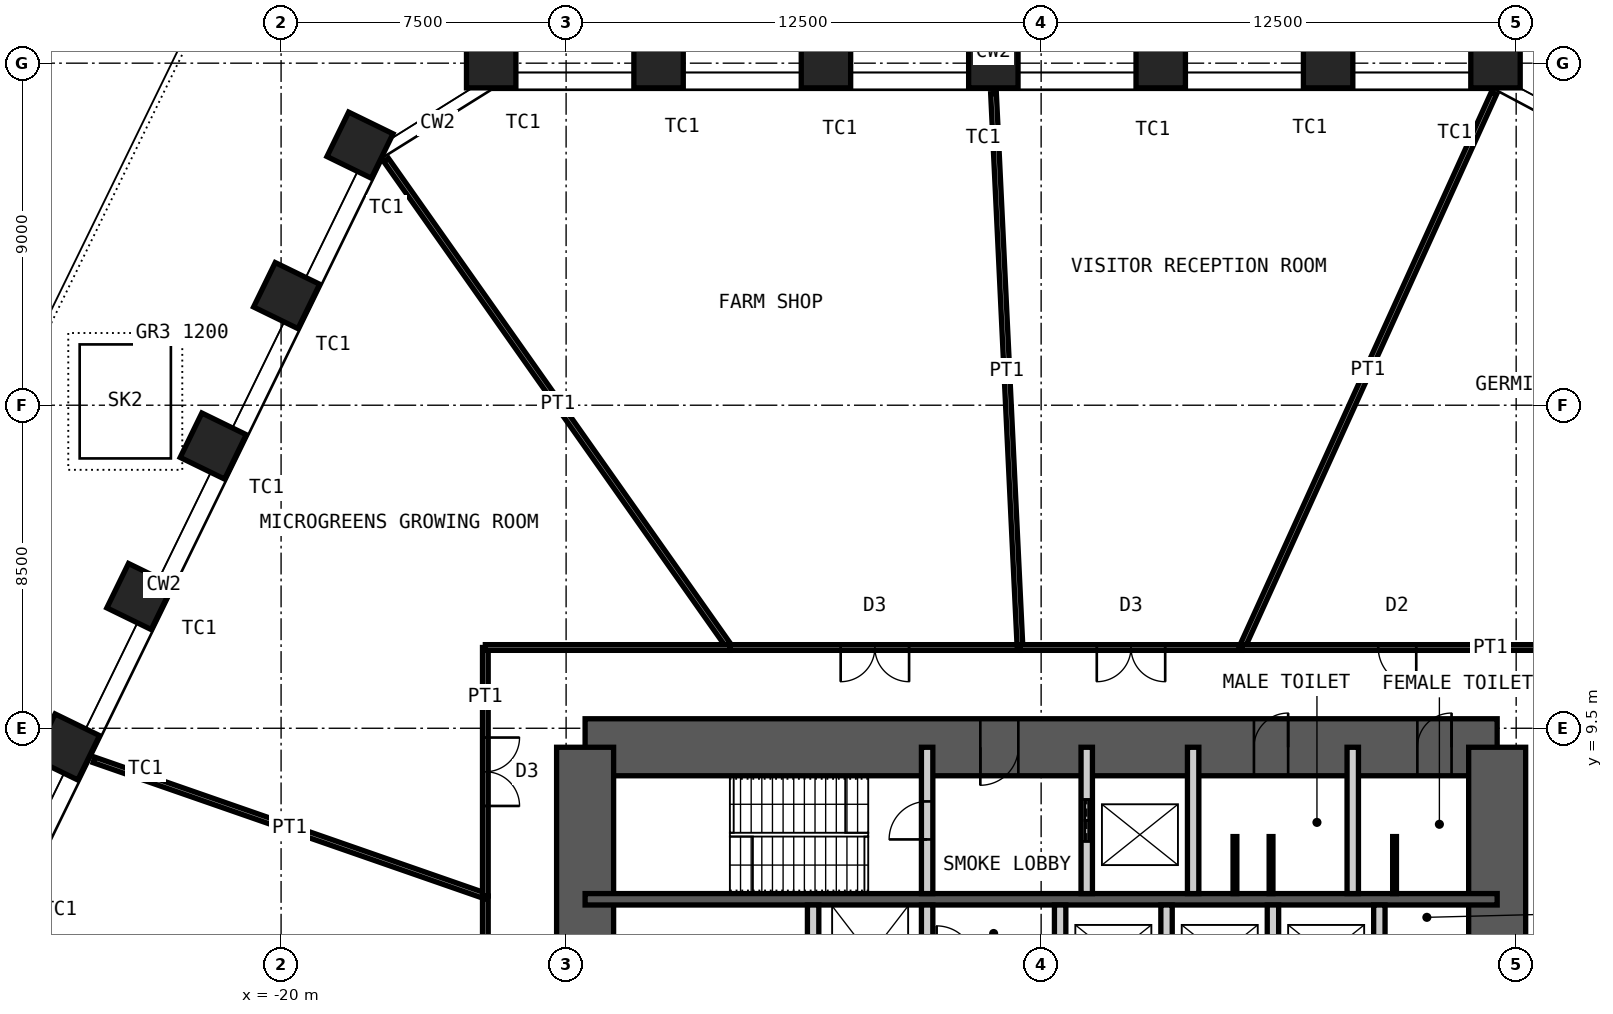
"""IFC4 building model, lengths in metres.
Left out: names, types, materials, properties, quantities, classifications, styles, units other than length and angle.
Written with IfcOpenShell. Run it as: python <this file> out.ifc"""

import sys

from ifc_helpers import new_model, si_unit, direction, frame, frame_2d, origin, origin_2d, place, context, subcontext, project, spatial, rectangle, hollow_rectangle, extrude, element, fill, save


model = new_model("IFC4")
c1 = context("Model", 3, precision=1e-05, world=origin(), true_north=direction((0.0, 1.0)))
c2 = subcontext(c1, "Body", "Model", "MODEL_VIEW")
j1 = project(units=[si_unit("LENGTHUNIT", "METRE"), si_unit("PLANEANGLEUNIT", "RADIAN")], contexts=[c1])
p1 = place(None, origin())
s1 = spatial("IfcSite", under=j1, at=p1, CompositionType="ELEMENT")
p2 = place(p1, origin())
s2 = spatial("IfcBuilding", under=s1, at=p2, CompositionType="ELEMENT")
p3 = place(p2, frame((0.0, 0.0, 17.0)))
s3 = spatial("IfcBuildingStorey", under=s2, at=p3, CompositionType="ELEMENT", Elevation=17.0)
for number, where, z_axis, x_axis in (
    (1, (-14.471, 27.0, 0.0), (0.0, 0.0, 1.0), (-1.0, 0.0, 0.0)),
    (2, (-10.067, 27.0, 0.0), (0.0, 0.0, 1.0), (-1.0, 0.0, 0.0)),
    (3, (-5.662, 27.0, 0.0), (0.0, 0.0, 1.0), (-1.0, 0.0, 0.0)),
    (4, (-1.258, 27.0, 0.0), (0.0, 0.0, 1.0), (-1.0, 0.0, 0.0)),
    (5, (3.147, 27.0, 0.0), (0.0, 0.0, 1.0), (-1.0, 0.0, 0.0)),
    (6, (7.552, 27.0, 0.0), (0.0, 0.0, 1.0), (-1.0, 0.0, 0.0)),
    (7, (11.956, 27.0, 0.0), (0.0, 0.0, 1.0), (-1.0, 0.0, 0.0)),
    (8, (-25.647, 9.008, 0.0), (0.0, 0.0, 1.0), (-0.438, -0.899, 0.0)),
    (9, (-23.716, 12.966, 0.0), (0.0, 0.0, 1.0), (-0.438, -0.899, 0.0)),
    (10, (-21.785, 16.925, 0.0), (0.0, 0.0, 1.0), (-0.438, -0.899, 0.0)),
    (11, (-19.854, 20.884, 0.0), (0.0, 0.0, 1.0), (-0.438, -0.899, 0.0)),
    (12, (-17.924, 24.843, 0.0), (0.0, 0.0, 1.0), (-0.438, -0.899, 0.0)),
):
    element("IfcColumn", number, at=place(p3, frame(where, z_axis=z_axis, x_axis=x_axis)), inside=s3, PredefinedType="COLUMN", context=c2, shape_type="SweptSolid", body=[
        extrude(hollow_rectangle(XDim=1.3, YDim=1.3, WallThickness=0.1, at=origin_2d()), origin(), (0.0, 0.0, 1.0), 5.0),
    ])
p4 = place(p3, frame((-12.0, 9.0, 0.0), z_axis=(0.0, 0.0, 1.0), x_axis=(1.0, 0.0, 0.0)))
e13 = element("IfcWall", 13, at=p4, inside=s3, PredefinedType="SHEAR", context=c2, shape_type="SweptSolid", body=[
    extrude(rectangle(XDim=24.0, YDim=1.5, at=frame_2d((12.0, 0.0))), origin(), (0.0, 0.0, 1.0), 5.0),
])
p5 = place(p4, frame((10.4, 0.0, 0.0)))
e14 = element("IfcOpeningElement", 14, at=p5, cuts=e13, PredefinedType="OPENING", context=c2, shape_type="SweptSolid", body=[
    extrude(rectangle(XDim=1.0, YDim=2.1, at=frame_2d((0.5, 1.05))), frame((0.0, 0.76, 0.0), z_axis=(0.0, -1.0, 0.0), x_axis=(1.0, 0.0, 0.0)), (0.0, 0.0, 1.0), 1.52),
])
p6 = place(p4, frame((17.6, 0.0, 0.0)))
e15 = element("IfcOpeningElement", 15, at=p6, cuts=e13, PredefinedType="OPENING", context=c2, shape_type="SweptSolid", body=[
    extrude(rectangle(XDim=0.9, YDim=2.1, at=frame_2d((0.45, 1.05))), frame((0.0, 0.76, 0.0), z_axis=(0.0, -1.0, 0.0), x_axis=(1.0, 0.0, 0.0)), (0.0, 0.0, 1.0), 1.52),
])
p7 = place(p4, frame((21.9, 0.0, 0.0)))
e16 = element("IfcOpeningElement", 16, at=p7, cuts=e13, PredefinedType="OPENING", context=c2, shape_type="SweptSolid", body=[
    extrude(rectangle(XDim=0.9, YDim=2.1, at=frame_2d((0.45, 1.05))), frame((0.0, 0.76, 0.0), z_axis=(0.0, -1.0, 0.0), x_axis=(1.0, 0.0, 0.0)), (0.0, 0.0, 1.0), 1.52),
])
p8 = place(p3, frame((12.0, -9.0, 0.0), z_axis=(0.0, 0.0, 1.0), x_axis=(0.0, 1.0, 0.0)))
e17 = element("IfcWall", 17, at=p8, inside=s3, PredefinedType="SHEAR", context=c2, shape_type="SweptSolid", body=[
    extrude(rectangle(XDim=18.0, YDim=1.5, at=frame_2d((9.0, 0.0))), origin(), (0.0, 0.0, 1.0), 5.0),
])
p9 = place(p8, frame((8.1, 0.0, 0.0)))
e18 = element("IfcOpeningElement", 18, at=p9, cuts=e17, PredefinedType="OPENING", context=c2, shape_type="SweptSolid", body=[
    extrude(rectangle(XDim=1.8, YDim=2.1, at=frame_2d((0.9, 1.05))), frame((0.0, 0.76, 0.0), z_axis=(0.0, -1.0, 0.0), x_axis=(1.0, 0.0, 0.0)), (0.0, 0.0, 1.0), 1.52),
])
p10 = place(p3, frame((-12.0, -9.0, 0.0), z_axis=(0.0, 0.0, 1.0), x_axis=(0.0, 1.0, 0.0)))
e19 = element("IfcWall", 19, at=p10, inside=s3, PredefinedType="SHEAR", context=c2, shape_type="SweptSolid", body=[
    extrude(rectangle(XDim=18.0, YDim=1.5, at=frame_2d((9.0, 0.0))), origin(), (0.0, 0.0, 1.0), 5.0),
])
p11 = place(p10, frame((8.1, 0.0, 0.0)))
e20 = element("IfcOpeningElement", 20, at=p11, cuts=e19, PredefinedType="OPENING", context=c2, shape_type="SweptSolid", body=[
    extrude(rectangle(XDim=1.8, YDim=2.1, at=frame_2d((0.9, 1.05))), frame((0.0, 0.76, 0.0), z_axis=(0.0, -1.0, 0.0), x_axis=(1.0, 0.0, 0.0)), (0.0, 0.0, 1.0), 1.52),
])
p12 = place(p3, frame((-12.0, 5.0, 0.0), z_axis=(0.0, 0.0, 1.0), x_axis=(1.0, 0.0, 0.0)))
e21 = element("IfcWall", 21, at=p12, inside=s3, PredefinedType="SHEAR", context=c2, shape_type="SweptSolid", body=[
    extrude(rectangle(XDim=24.0, YDim=0.3, at=frame_2d((12.0, 0.0))), origin(), (0.0, 0.0, 1.0), 5.0),
])
p13 = place(p3, frame((-3.0, 5.15, 0.0), z_axis=(0.0, 0.0, 1.0), x_axis=(0.0, 1.0, 0.0)))
e22 = element("IfcWall", 22, at=p13, inside=s3, PredefinedType="PARTITIONING", context=c2, shape_type="SweptSolid", body=[
    extrude(rectangle(XDim=3.85, YDim=0.3, at=frame_2d((1.925, 0.0))), origin(), (0.0, 0.0, 1.0), 4.78),
])
p14 = place(p13, frame((1.425, 0.0, 0.0)))
e23 = element("IfcOpeningElement", 23, at=p14, cuts=e22, PredefinedType="OPENING", context=c2, shape_type="SweptSolid", body=[
    extrude(rectangle(XDim=1.0, YDim=2.1, at=frame_2d((0.5, 1.05))), frame((0.0, 0.16, 0.0), z_axis=(0.0, -1.0, 0.0), x_axis=(1.0, 0.0, 0.0)), (0.0, 0.0, 1.0), 0.32),
])
p15 = place(p3, frame((1.2, 5.15, 0.0), z_axis=(0.0, 0.0, 1.0), x_axis=(0.0, 1.0, 0.0)))
e24 = element("IfcWall", 24, at=p15, inside=s3, PredefinedType="PARTITIONING", context=c2, shape_type="SweptSolid", body=[
    extrude(rectangle(XDim=3.85, YDim=0.3, at=frame_2d((1.925, 0.0))), origin(), (0.0, 0.0, 1.0), 4.78),
])
p16 = place(p15, frame((1.375, 0.0, 0.0)))
e25 = element("IfcOpeningElement", 25, at=p16, cuts=e24, PredefinedType="OPENING", context=c2, shape_type="SweptSolid", body=[
    extrude(rectangle(XDim=1.1, YDim=2.4, at=frame_2d((0.55, 1.2))), frame((0.0, 0.16, 0.0), z_axis=(0.0, -1.0, 0.0), x_axis=(1.0, 0.0, 0.0)), (0.0, 0.0, 1.0), 0.32),
])
for number, where, z_axis, x_axis in (
    (26, (4.0, 5.15, 0.0), (0.0, 0.0, 1.0), (0.0, 1.0, 0.0)),
    (27, (8.2, 5.15, 0.0), (0.0, 0.0, 1.0), (0.0, 1.0, 0.0)),
):
    element("IfcWall", number, at=place(p3, frame(where, z_axis=z_axis, x_axis=x_axis)), inside=s3, PredefinedType="PARTITIONING", context=c2, shape_type="SweptSolid", body=[
        extrude(rectangle(XDim=3.85, YDim=0.3, at=frame_2d((1.925, 0.0))), origin(), (0.0, 0.0, 1.0), 4.78),
    ])
for number, where, z_axis, x_axis in (
    (28, (-6.0, 2.2, 0.0), (0.0, 0.0, 1.0), (0.0, 1.0, 0.0)),
    (29, (-3.0, 2.2, 0.0), (0.0, 0.0, 1.0), (0.0, 1.0, 0.0)),
    (30, (0.5, 2.2, 0.0), (0.0, 0.0, 1.0), (0.0, 1.0, 0.0)),
    (31, (3.3, 2.2, 0.0), (0.0, 0.0, 1.0), (0.0, 1.0, 0.0)),
    (32, (6.1, 2.2, 0.0), (0.0, 0.0, 1.0), (0.0, 1.0, 0.0)),
    (33, (8.9, 2.2, 0.0), (0.0, 0.0, 1.0), (0.0, 1.0, 0.0)),
):
    element("IfcWall", number, at=place(p3, frame(where, z_axis=z_axis, x_axis=x_axis)), inside=s3, PredefinedType="PARTITIONING", context=c2, shape_type="SweptSolid", body=[
        extrude(rectangle(XDim=2.65, YDim=0.3, at=frame_2d((1.325, 0.0))), origin(), (0.0, 0.0, 1.0), 4.78),
    ])
for number, where, z_axis, x_axis in (
    (34, (5.1, 5.15, 0.0), (0.0, 0.0, 1.0), (0.0, 1.0, 0.0)),
    (35, (6.05, 5.15, 0.0), (0.0, 0.0, 1.0), (0.0, 1.0, 0.0)),
    (36, (9.3, 5.15, 0.0), (0.0, 0.0, 1.0), (0.0, 1.0, 0.0)),
):
    element("IfcWall", number, at=place(p3, frame(where, z_axis=z_axis, x_axis=x_axis)), inside=s3, PredefinedType="PARTITIONING", context=c2, shape_type="SweptSolid", body=[
        extrude(rectangle(XDim=1.5, YDim=0.1, at=frame_2d((0.75, 0.0))), origin(), (0.0, 0.0, 1.0), 2.1),
    ])
p17 = place(p3, frame((-17.237, 24.454, 0.0), z_axis=(0.0, 0.0, 1.0), x_axis=(0.576128572739, -0.817359081233, 0.0)))
e37 = element("IfcWall", 37, at=p17, inside=s3, PredefinedType="PARTITIONING", context=c2, shape_type="SweptSolid", body=[
    extrude(rectangle(XDim=15.696, YDim=0.15, at=frame_2d((7.848, 0.0))), origin(), (0.0, 0.0, 1.0), 3.7),
])
p18 = place(p3, frame((-8.194, 11.625, 0.0), z_axis=(0.0, 0.0, 1.0), x_axis=(1.0, 0.0, 0.0)))
e38 = element("IfcWall", 38, at=p18, inside=s3, PredefinedType="PARTITIONING", context=c2, shape_type="SweptSolid", body=[
    extrude(rectangle(XDim=7.638, YDim=0.15, at=frame_2d((3.819, 0.0))), origin(), (0.0, 0.0, 1.0), 4.8),
])
p19 = place(p18, frame((2.919, 0.0, 0.0)))
e39 = element("IfcOpeningElement", 39, at=p19, cuts=e38, PredefinedType="OPENING", context=c2, shape_type="SweptSolid", body=[
    extrude(rectangle(XDim=1.8, YDim=2.4, at=frame_2d((0.9, 1.2))), frame((0.0, 0.085, 0.0), z_axis=(0.0, -1.0, 0.0), x_axis=(1.0, 0.0, 0.0)), (0.0, 0.0, 1.0), 0.17),
])
p20 = place(p3, frame((-1.253, 26.2, 0.0), z_axis=(0.0, 0.0, 1.0), x_axis=(0.047767854541, -0.998858464485, 0.0)))
e40 = element("IfcWall", 40, at=p20, inside=s3, PredefinedType="PARTITIONING", context=c2, shape_type="SweptSolid", body=[
    extrude(rectangle(XDim=14.592, YDim=0.15, at=frame_2d((7.296, 0.0))), origin(), (0.0, 0.0, 1.0), 3.7),
])
p21 = place(p3, frame((-0.556, 11.625, 0.0), z_axis=(0.0, 0.0, 1.0), x_axis=(1.0, 0.0, 0.0)))
e41 = element("IfcWall", 41, at=p21, inside=s3, PredefinedType="PARTITIONING", context=c2, shape_type="SweptSolid", body=[
    extrude(rectangle(XDim=5.841, YDim=0.15, at=frame_2d((2.92, 0.0))), origin(), (0.0, 0.0, 1.0), 4.8),
])
p22 = place(p21, frame((2.02, 0.0, 0.0)))
e42 = element("IfcOpeningElement", 42, at=p22, cuts=e41, PredefinedType="OPENING", context=c2, shape_type="SweptSolid", body=[
    extrude(rectangle(XDim=1.8, YDim=2.4, at=frame_2d((0.9, 1.2))), frame((0.0, 0.085, 0.0), z_axis=(0.0, -1.0, 0.0), x_axis=(1.0, 0.0, 0.0)), (0.0, 0.0, 1.0), 0.17),
])
p23 = place(p3, frame((11.915, 26.209, 0.0), z_axis=(0.0, 0.0, 1.0), x_axis=(-0.41384427845, -0.910347688081, 0.0)))
e43 = element("IfcWall", 43, at=p23, inside=s3, PredefinedType="PARTITIONING", context=c2, shape_type="SweptSolid", body=[
    extrude(rectangle(XDim=16.02, YDim=0.15, at=frame_2d((8.01, 0.0))), origin(), (0.0, 0.0, 1.0), 3.7),
])
p24 = place(p3, frame((5.285, 11.625, 0.0), z_axis=(0.0, 0.0, 1.0), x_axis=(1.0, 0.0, 0.0)))
e44 = element("IfcWall", 44, at=p24, inside=s3, PredefinedType="PARTITIONING", context=c2, shape_type="SweptSolid", body=[
    extrude(rectangle(XDim=8.172, YDim=0.15, at=frame_2d((4.086, 0.0))), origin(), (0.0, 0.0, 1.0), 4.8),
])
p25 = place(p24, frame((3.586, 0.0, 0.0)))
e45 = element("IfcOpeningElement", 45, at=p25, cuts=e44, PredefinedType="OPENING", context=c2, shape_type="SweptSolid", body=[
    extrude(rectangle(XDim=1.0, YDim=2.4, at=frame_2d((0.5, 1.2))), frame((0.0, 0.085, 0.0), z_axis=(0.0, -1.0, 0.0), x_axis=(1.0, 0.0, 0.0)), (0.0, 0.0, 1.0), 0.17),
])
p26 = place(p3, frame((-14.625, -1.422, 0.0), z_axis=(0.0, 0.0, 1.0), x_axis=(0.0, 1.0, 0.0)))
e46 = element("IfcWall", 46, at=p26, inside=s3, PredefinedType="PARTITIONING", context=c2, shape_type="SweptSolid", body=[
    extrude(rectangle(XDim=6.508, YDim=0.15, at=frame_2d((3.254, 0.0))), origin(), (0.0, 0.0, 1.0), 4.8),
])
p27 = place(p26, frame((2.754, 0.0, 0.0)))
e47 = element("IfcOpeningElement", 47, at=p27, cuts=e46, PredefinedType="OPENING", context=c2, shape_type="SweptSolid", body=[
    extrude(rectangle(XDim=1.0, YDim=2.4, at=frame_2d((0.5, 1.2))), frame((0.0, 0.085, 0.0), z_axis=(0.0, -1.0, 0.0), x_axis=(1.0, 0.0, 0.0)), (0.0, 0.0, 1.0), 0.17),
])
p28 = place(p3, frame((-24.923, 8.668, 0.0), z_axis=(0.0, 0.0, 1.0), x_axis=(0.944503744172, -0.328500650295, 0.0)))
e48 = element("IfcWall", 48, at=p28, inside=s3, PredefinedType="PARTITIONING", context=c2, shape_type="SweptSolid", body=[
    extrude(rectangle(XDim=10.903, YDim=0.15, at=frame_2d((5.452, 0.0))), origin(), (0.0, 0.0, 1.0), 3.7),
])
p29 = place(p3, frame((-14.625, 5.086, 0.0), z_axis=(0.0, 0.0, 1.0), x_axis=(0.0, 1.0, 0.0)))
e49 = element("IfcWall", 49, at=p29, inside=s3, PredefinedType="PARTITIONING", context=c2, shape_type="SweptSolid", body=[
    extrude(rectangle(XDim=6.539, YDim=0.15, at=frame_2d((3.27, 0.0))), origin(), (0.0, 0.0, 1.0), 4.8),
])
p30 = place(p29, frame((2.369, 0.0, 0.0)))
e50 = element("IfcOpeningElement", 50, at=p30, cuts=e49, PredefinedType="OPENING", context=c2, shape_type="SweptSolid", body=[
    extrude(rectangle(XDim=1.8, YDim=2.4, at=frame_2d((0.9, 1.2))), frame((0.0, 0.085, 0.0), z_axis=(0.0, -1.0, 0.0), x_axis=(1.0, 0.0, 0.0)), (0.0, 0.0, 1.0), 0.17),
])
p31 = place(p3, frame((-14.625, 11.625, 0.0), z_axis=(0.0, 0.0, 1.0), x_axis=(1.0, 0.0, 0.0)))
e51 = element("IfcWall", 51, at=p31, inside=s3, PredefinedType="PARTITIONING", context=c2, shape_type="SweptSolid", body=[
    extrude(rectangle(XDim=6.431, YDim=0.15, at=frame_2d((3.216, 0.0))), origin(), (0.0, 0.0, 1.0), 4.8),
])
p32 = place(p5, origin())
e52 = element("IfcDoor", 52, at=p32, inside=s3, OperationType="SINGLE_SWING_LEFT", PredefinedType="DOOR", context=c2, shape_type="SweptSolid", body=[
    extrude(rectangle(XDim=1.0, YDim=2.1, at=frame_2d((0.5, 1.05))), frame((0.0, 0.025, 0.0), z_axis=(0.0, -1.0, 0.0), x_axis=(1.0, 0.0, 0.0)), (0.0, 0.0, 1.0), 0.05),
])
fill(e14, e52)
p33 = place(p6, origin())
e53 = element("IfcDoor", 53, at=p33, inside=s3, OperationType="SINGLE_SWING_LEFT", PredefinedType="DOOR", context=c2, shape_type="SweptSolid", body=[
    extrude(rectangle(XDim=0.9, YDim=2.1, at=frame_2d((0.45, 1.05))), frame((0.0, 0.025, 0.0), z_axis=(0.0, -1.0, 0.0), x_axis=(1.0, 0.0, 0.0)), (0.0, 0.0, 1.0), 0.05),
])
fill(e15, e53)
p34 = place(p7, origin())
e54 = element("IfcDoor", 54, at=p34, inside=s3, OperationType="SINGLE_SWING_LEFT", PredefinedType="DOOR", context=c2, shape_type="SweptSolid", body=[
    extrude(rectangle(XDim=0.9, YDim=2.1, at=frame_2d((0.45, 1.05))), frame((0.0, 0.025, 0.0), z_axis=(0.0, -1.0, 0.0), x_axis=(1.0, 0.0, 0.0)), (0.0, 0.0, 1.0), 0.05),
])
fill(e16, e54)
p35 = place(p14, origin())
e55 = element("IfcDoor", 55, at=p35, inside=s3, OperationType="SINGLE_SWING_RIGHT", PredefinedType="DOOR", context=c2, shape_type="SweptSolid", body=[
    extrude(rectangle(XDim=1.0, YDim=2.1, at=frame_2d((0.5, 1.05))), frame((0.0, 0.025, 0.0), z_axis=(0.0, -1.0, 0.0), x_axis=(1.0, 0.0, 0.0)), (0.0, 0.0, 1.0), 0.05),
])
fill(e23, e55)
p36 = place(p16, origin())
e56 = element("IfcDoor", 56, at=p36, inside=s3, OperationType="DOUBLE_DOOR_SLIDING", PredefinedType="DOOR", context=c2, shape_type="SweptSolid", body=[
    extrude(rectangle(XDim=1.1, YDim=2.4, at=frame_2d((0.55, 1.2))), frame((0.0, 0.025, 0.0), z_axis=(0.0, -1.0, 0.0), x_axis=(1.0, 0.0, 0.0)), (0.0, 0.0, 1.0), 0.05),
])
fill(e25, e56)
p37 = place(p19, origin())
e57 = element("IfcDoor", 57, at=p37, inside=s3, OperationType="DOUBLE_DOOR_DOUBLE_SWING", PredefinedType="DOOR", context=c2, shape_type="SweptSolid", body=[
    extrude(rectangle(XDim=1.8, YDim=2.4, at=frame_2d((0.9, 1.2))), frame((0.0, 0.025, 0.0), z_axis=(0.0, -1.0, 0.0), x_axis=(1.0, 0.0, 0.0)), (0.0, 0.0, 1.0), 0.05),
])
fill(e39, e57)
p38 = place(p22, origin())
e58 = element("IfcDoor", 58, at=p38, inside=s3, OperationType="DOUBLE_DOOR_DOUBLE_SWING", PredefinedType="DOOR", context=c2, shape_type="SweptSolid", body=[
    extrude(rectangle(XDim=1.8, YDim=2.4, at=frame_2d((0.9, 1.2))), frame((0.0, 0.025, 0.0), z_axis=(0.0, -1.0, 0.0), x_axis=(1.0, 0.0, 0.0)), (0.0, 0.0, 1.0), 0.05),
])
fill(e42, e58)
p39 = place(p25, origin())
e59 = element("IfcDoor", 59, at=p39, inside=s3, OperationType="SINGLE_SWING_RIGHT", PredefinedType="DOOR", context=c2, shape_type="SweptSolid", body=[
    extrude(rectangle(XDim=1.0, YDim=2.4, at=frame_2d((0.5, 1.2))), frame((0.0, 0.025, 0.0), z_axis=(0.0, -1.0, 0.0), x_axis=(1.0, 0.0, 0.0)), (0.0, 0.0, 1.0), 0.05),
])
fill(e45, e59)
p40 = place(p30, origin())
e60 = element("IfcDoor", 60, at=p40, inside=s3, OperationType="DOUBLE_DOOR_DOUBLE_SWING", PredefinedType="DOOR", context=c2, shape_type="SweptSolid", body=[
    extrude(rectangle(XDim=1.8, YDim=2.4, at=frame_2d((0.9, 1.2))), frame((0.0, 0.025, 0.0), z_axis=(0.0, -1.0, 0.0), x_axis=(1.0, 0.0, 0.0)), (0.0, 0.0, 1.0), 0.05),
])
fill(e50, e60)
p41 = place(p3, frame((0.0, 0.0, -0.3)))
p42 = place(p41, frame((-24.1, 18.1, 0.0)))
p43 = place(p42, frame((0.0, 0.0, 0.25)))
e61 = element("IfcWindow", 61, at=p43, inside=s3, PartitioningType="SINGLE_PANEL", PredefinedType="SKYLIGHT", context=c2, shape_type="SweptSolid", body=[
    extrude(rectangle(XDim=2.4, YDim=3.0, at=origin_2d()), origin(), (0.0, 0.0, 1.0), 0.05),
])
save(model, sys.argv[1])
